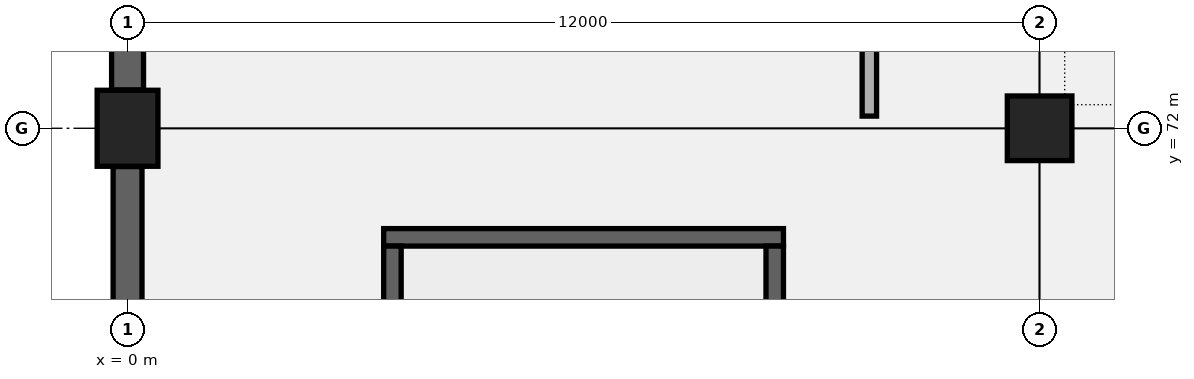
"""IFC4 building model, lengths in metres.
Left out: names, types, materials, properties, quantities, classifications, styles, units other than length and angle.
Written with IfcOpenShell. Run it as: python <this file> out.ifc"""

import sys

from ifc_helpers import new_model, si_unit, direction, frame, frame_2d, origin, origin_2d, place, context, subcontext, project, spatial, rectangle, circle, extrude, element, save


model = new_model("IFC4")
c1 = context("Model", 3, precision=1e-05, world=origin(), true_north=direction((0.0, 1.0)))
c2 = subcontext(c1, "Body", "Model", "MODEL_VIEW")
j1 = project(units=[si_unit("LENGTHUNIT", "METRE"), si_unit("PLANEANGLEUNIT", "RADIAN")], contexts=[c1])
p1 = place(None, origin())
s1 = spatial("IfcSite", under=j1, at=p1, CompositionType="ELEMENT")
p2 = place(p1, origin())
s2 = spatial("IfcBuilding", under=s1, at=p2, CompositionType="ELEMENT")
p3 = place(p2, frame((0.0, 0.0, -4.8)))
s3 = spatial("IfcBuildingStorey", under=s2, at=p3, CompositionType="ELEMENT", Elevation=-4.8)
p4 = place(p3, frame((0.0, 72.0, 0.0), z_axis=(0.0, 0.0, 1.0), x_axis=(1.0, 0.0, 0.0)))
e1 = element("IfcColumn", 1, at=p4, inside=s3, PredefinedType="COLUMN", context=c2, shape_type="SweptSolid", body=[
    extrude(rectangle(XDim=0.8, YDim=1.0, at=origin_2d()), origin(), (0.0, 0.0, 1.0), 4.8),
])
p5 = place(p3, frame((12.0, 72.0, 0.0), z_axis=(0.0, 0.0, 1.0), x_axis=(1.0, 0.0, 0.0)))
e2 = element("IfcColumn", 2, at=p5, inside=s3, PredefinedType="COLUMN", context=c2, shape_type="SweptSolid", body=[
    extrude(circle(Radius=0.425, at=origin_2d()), origin(), (0.0, 0.0, 1.0), 4.8),
])
p6 = place(p3, frame((0.0, 60.554, 0.0), z_axis=(0.0, 0.0, 1.0), x_axis=(0.0, 1.0, 0.0)))
e3 = element("IfcWall", 3, at=p6, inside=s3, PredefinedType="STANDARD", context=c2, shape_type="SweptSolid", body=[
    extrude(rectangle(XDim=10.942, YDim=0.38, at=frame_2d((5.471, 0.0))), origin(), (0.0, 0.0, 1.0), 4.46),
])
p7 = place(p3, frame((0.0, 72.504, 0.0), z_axis=(0.0, 0.0, 1.0), x_axis=(0.0, 1.0, 0.0)))
e4 = element("IfcWall", 4, at=p7, inside=s3, PredefinedType="STANDARD", context=c2, shape_type="SweptSolid", body=[
    extrude(rectangle(XDim=11.067, YDim=0.42, at=frame_2d((5.534, 0.0))), origin(), (0.0, 0.0, 1.0), 4.46),
])
p8 = place(p3, frame((3.37, 70.565, 0.0), z_axis=(0.0, 0.0, 1.0), x_axis=(1.0, 0.0, 0.0)))
e5 = element("IfcWall", 5, at=p8, inside=s3, PredefinedType="SHEAR", context=c2, shape_type="SweptSolid", body=[
    extrude(rectangle(XDim=5.26, YDim=0.23, at=frame_2d((2.63, 0.0))), origin(), (0.0, 0.0, 1.0), 4.5),
])
for number, where, z_axis, x_axis in (
    (6, (3.485, 61.55, 0.0), (0.0, 0.0, 1.0), (0.0, 1.0, 0.0)),
    (7, (8.515, 61.55, 0.0), (0.0, 0.0, 1.0), (0.0, 1.0, 0.0)),
):
    element("IfcWall", number, at=place(p3, frame(where, z_axis=z_axis, x_axis=x_axis)), inside=s3, PredefinedType="SHEAR", context=c2, shape_type="SweptSolid", body=[
        extrude(rectangle(XDim=8.9, YDim=0.23, at=frame_2d((4.45, 0.0))), origin(), (0.0, 0.0, 1.0), 4.5),
    ])
p9 = place(p3, frame((9.76, 72.16, 0.0), z_axis=(0.0, 0.0, 1.0), x_axis=(0.0, 1.0, 0.0)))
e8 = element("IfcWall", 8, at=p9, inside=s3, PredefinedType="PARTITIONING", context=c2, shape_type="SweptSolid", body=[
    extrude(rectangle(XDim=11.68, YDim=0.19, at=frame_2d((5.84, 0.0))), origin(), (0.0, 0.0, 1.0), 3.92),
])
p10 = place(p9, frame((5.31, 0.0, 0.0)))
e9 = element("IfcOpeningElement", 9, at=p10, cuts=e8, PredefinedType="OPENING", context=c2, shape_type="SweptSolid", body=[
    extrude(rectangle(XDim=1.06, YDim=2.15, at=frame_2d((0.53, 1.075))), frame((0.0, 0.105, 0.0), z_axis=(0.0, -1.0, 0.0), x_axis=(1.0, 0.0, 0.0)), (0.0, 0.0, 1.0), 0.21),
])
save(model, sys.argv[1])
